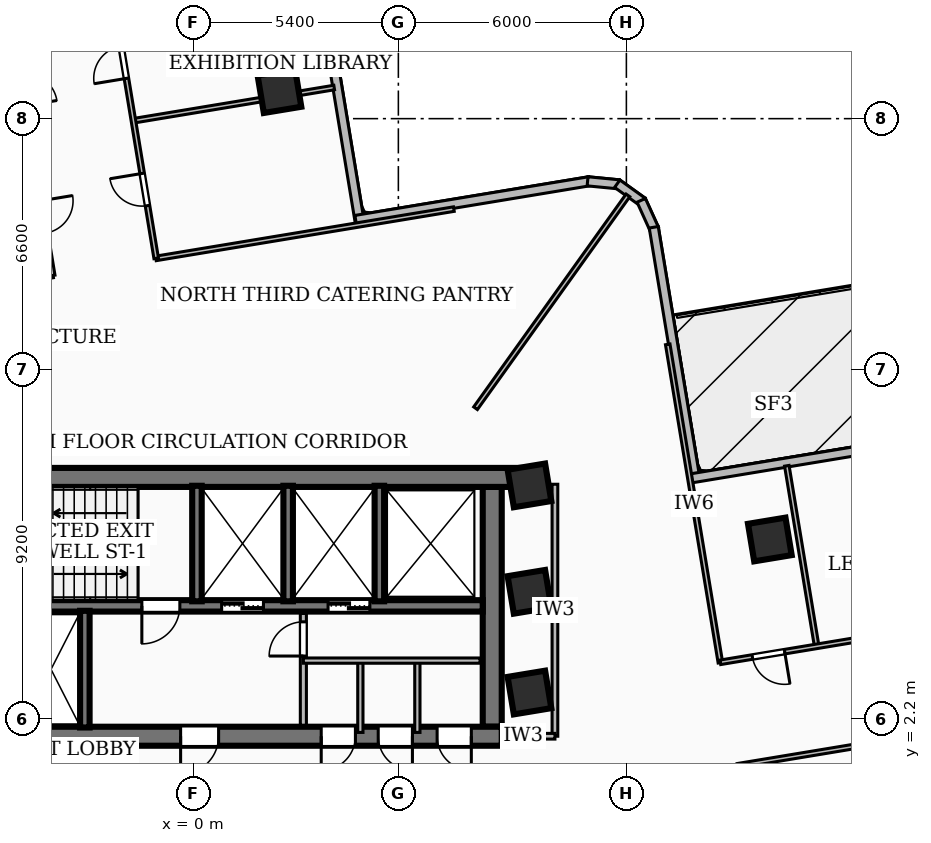
"""IFC4 building model, lengths in metres.
Left out: names, types, materials, properties, quantities, classifications, styles, units other than length and angle.
Written with IfcOpenShell. Run it as: python <this file> out.ifc"""

import sys

from ifc_helpers import new_model, si_unit, direction, frame, frame_2d, origin, origin_2d, place, context, subcontext, project, spatial, rectangle, extrude, element, fill, save


model = new_model("IFC4")
c1 = context("Model", 3, precision=1e-05, world=origin(), true_north=direction((0.0, 1.0)))
c2 = subcontext(c1, "Body", "Model", "MODEL_VIEW")
j1 = project(units=[si_unit("LENGTHUNIT", "METRE"), si_unit("PLANEANGLEUNIT", "RADIAN")], contexts=[c1])
p1 = place(None, origin())
s1 = spatial("IfcSite", under=j1, at=p1, CompositionType="ELEMENT")
p2 = place(p1, origin())
s2 = spatial("IfcBuilding", under=s1, at=p2, CompositionType="ELEMENT")
p3 = place(p2, frame((0.0, 0.0, 96.48)))
s3 = spatial("IfcBuildingStorey", under=s2, at=p3, CompositionType="ELEMENT", Elevation=96.48)
p4 = place(p3, frame((-8.78, 8.56, 0.0), z_axis=(0.0, 0.0, 1.0), x_axis=(1.0, 0.0, 0.0)))
e1 = element("IfcWall", 1, at=p4, inside=s3, PredefinedType="SHEAR", context=c2, shape_type="SweptSolid", body=[
    extrude(rectangle(XDim=17.56, YDim=0.5, at=frame_2d((8.78, 0.0))), origin(), (0.0, 0.0, 1.0), 3.34),
])
p5 = place(p3, frame((8.12, 1.75, 0.0), z_axis=(0.0, 0.0, 1.0), x_axis=(-1.0, 0.0, 0.0)))
e2 = element("IfcWall", 2, at=p5, inside=s3, PredefinedType="SHEAR", context=c2, shape_type="SweptSolid", body=[
    extrude(rectangle(XDim=16.24, YDim=0.5, at=frame_2d((8.12, 0.0))), origin(), (0.0, 0.0, 1.0), 3.34),
])
p6 = place(p5, frame((7.45, 0.0, 0.0)))
e3 = element("IfcOpeningElement", 3, at=p6, cuts=e2, PredefinedType="OPENING", context=c2, shape_type="SweptSolid", body=[
    extrude(rectangle(XDim=1.0, YDim=2.1, at=frame_2d((0.5, 1.05))), frame((0.0, 0.26, 0.0), z_axis=(0.0, -1.0, 0.0), x_axis=(1.0, 0.0, 0.0)), (0.0, 0.0, 1.0), 0.52),
])
p7 = place(p5, frame((3.85, 0.0, 0.0)))
e4 = element("IfcOpeningElement", 4, at=p7, cuts=e2, PredefinedType="OPENING", context=c2, shape_type="SweptSolid", body=[
    extrude(rectangle(XDim=0.9, YDim=2.06, at=frame_2d((0.45, 1.03))), frame((0.0, 0.26, 0.0), z_axis=(0.0, -1.0, 0.0), x_axis=(1.0, 0.0, 0.0)), (0.0, 0.0, 1.0), 0.52),
])
p8 = place(p5, frame((2.35, 0.0, 0.0)))
e5 = element("IfcOpeningElement", 5, at=p8, cuts=e2, PredefinedType="OPENING", context=c2, shape_type="SweptSolid", body=[
    extrude(rectangle(XDim=0.9, YDim=2.06, at=frame_2d((0.45, 1.03))), frame((0.0, 0.26, 0.0), z_axis=(0.0, -1.0, 0.0), x_axis=(1.0, 0.0, 0.0)), (0.0, 0.0, 1.0), 0.52),
])
p9 = place(p5, frame((0.8, 0.0, 0.0)))
e6 = element("IfcOpeningElement", 6, at=p9, cuts=e2, PredefinedType="OPENING", context=c2, shape_type="SweptSolid", body=[
    extrude(rectangle(XDim=0.9, YDim=2.06, at=frame_2d((0.45, 1.03))), frame((0.0, 0.26, 0.0), z_axis=(0.0, -1.0, 0.0), x_axis=(1.0, 0.0, 0.0)), (0.0, 0.0, 1.0), 0.52),
])
p10 = place(p3, frame((7.87, 8.31, 0.0), z_axis=(0.0, 0.0, 1.0), x_axis=(0.0, -1.0, 0.0)))
e7 = element("IfcWall", 7, at=p10, inside=s3, PredefinedType="SHEAR", context=c2, shape_type="SweptSolid", body=[
    extrude(rectangle(XDim=6.31, YDim=0.5, at=frame_2d((3.155, 0.0))), origin(), (0.0, 0.0, 1.0), 3.34),
])
p11 = place(p3, frame((7.62, 5.18, 0.0), z_axis=(0.0, 0.0, 1.0), x_axis=(-1.0, 0.0, 0.0)))
e8 = element("IfcWall", 8, at=p11, inside=s3, PredefinedType="SOLIDWALL", context=c2, shape_type="SweptSolid", body=[
    extrude(rectangle(XDim=15.24, YDim=0.3, at=frame_2d((7.62, 0.0))), origin(), (0.0, 0.0, 1.0), 3.34),
])
p12 = place(p11, frame((5.77, 0.0, 0.0)))
e9 = element("IfcOpeningElement", 9, at=p12, cuts=e8, PredefinedType="OPENING", context=c2, shape_type="SweptSolid", body=[
    extrude(rectangle(XDim=1.1, YDim=2.15, at=frame_2d((0.55, 1.075))), frame((0.0, 0.16, 0.0), z_axis=(0.0, -1.0, 0.0), x_axis=(1.0, 0.0, 0.0)), (0.0, 0.0, 1.0), 0.32),
])
p13 = place(p11, frame((2.97, 0.0, 0.0)))
e10 = element("IfcOpeningElement", 10, at=p13, cuts=e8, PredefinedType="OPENING", context=c2, shape_type="SweptSolid", body=[
    extrude(rectangle(XDim=1.1, YDim=2.15, at=frame_2d((0.55, 1.075))), frame((0.0, 0.16, 0.0), z_axis=(0.0, -1.0, 0.0), x_axis=(1.0, 0.0, 0.0)), (0.0, 0.0, 1.0), 0.32),
])
p14 = place(p11, frame((7.97, 0.0, 0.0)))
e11 = element("IfcOpeningElement", 11, at=p14, cuts=e8, PredefinedType="OPENING", context=c2, shape_type="SweptSolid", body=[
    extrude(rectangle(XDim=1.0, YDim=2.1, at=frame_2d((0.5, 1.05))), frame((0.0, 0.16, 0.0), z_axis=(0.0, -1.0, 0.0), x_axis=(1.0, 0.0, 0.0)), (0.0, 0.0, 1.0), 0.32),
])
for number, where, z_axis, x_axis in (
    (12, (0.1, 5.3, 0.0), (0.0, 0.0, 1.0), (0.0, 1.0, 0.0)),
    (13, (2.5, 5.3, 0.0), (0.0, 0.0, 1.0), (0.0, 1.0, 0.0)),
    (14, (4.9, 5.3, 0.0), (0.0, 0.0, 1.0), (0.0, 1.0, 0.0)),
):
    element("IfcWall", number, at=place(p3, frame(where, z_axis=z_axis, x_axis=x_axis)), inside=s3, PredefinedType="SOLIDWALL", context=c2, shape_type="SweptSolid", body=[
        extrude(rectangle(XDim=3.04, YDim=0.25, at=frame_2d((1.52, 0.0))), origin(), (0.0, 0.0, 1.0), 3.34),
    ])
p15 = place(p3, frame((-2.85, 1.98, 0.0), z_axis=(0.0, 0.0, 1.0), x_axis=(0.0, 1.0, 0.0)))
e15 = element("IfcWall", 15, at=p15, inside=s3, PredefinedType="SOLIDWALL", context=c2, shape_type="SweptSolid", body=[
    extrude(rectangle(XDim=3.07, YDim=0.25, at=frame_2d((1.535, 0.0))), origin(), (0.0, 0.0, 1.0), 3.34),
])
for number, where, z_axis, x_axis in (
    (16, (8.85, 2.9, 0.0), (0.0, 0.0, 1.0), (0.987, 0.163, 0.0)),
    (17, (8.85, 5.55, 0.0), (0.0, 0.0, 1.0), (0.987, 0.163, 0.0)),
    (18, (8.85, 8.35, 0.0), (0.0, 0.0, 1.0), (0.987, 0.163, 0.0)),
    (19, (15.175, 6.927, 0.0), (0.0, 0.0, 1.0), (0.987, 0.163, 0.0)),
    (20, (2.271, 18.724, 0.0), (0.0, 0.0, 1.0), (0.987, 0.163, 0.0)),
):
    element("IfcColumn", number, at=place(p3, frame(where, z_axis=z_axis, x_axis=x_axis)), inside=s3, PredefinedType="COLUMN", context=c2, shape_type="SweptSolid", body=[
        extrude(rectangle(XDim=1.0, YDim=1.0, at=origin_2d()), origin(), (0.0, 0.0, 1.0), 3.6),
    ])
p16 = place(p3, frame((2.415, 27.169, 0.0), z_axis=(0.0, 0.0, 1.0), x_axis=(0.163307072567, -0.986575288587, 0.0)))
e21 = element("IfcWall", 21, at=p16, inside=s3, PredefinedType="SOLIDWALL", context=c2, shape_type="SweptSolid", body=[
    extrude(rectangle(XDim=12.075, YDim=0.24, at=frame_2d((6.038, 0.0))), origin(), (0.0, 0.0, 1.0), 2.486),
])
p17 = place(p3, frame((4.276, 15.335, 0.0), z_axis=(0.0, 0.0, 1.0), x_axis=(0.986586851863, 0.16323720082, 0.0)))
e22 = element("IfcWall", 22, at=p17, inside=s3, PredefinedType="SOLIDWALL", context=c2, shape_type="SweptSolid", body=[
    extrude(rectangle(XDim=6.237, YDim=0.24, at=frame_2d((3.118, 0.0))), origin(), (0.0, 0.0, 1.0), 2.486),
])
p18 = place(p3, frame((10.379, 16.351, 0.0), z_axis=(0.0, 0.0, 1.0), x_axis=(0.995335447313, -0.096474594184, 0.0)))
e23 = element("IfcWall", 23, at=p18, inside=s3, PredefinedType="SOLIDWALL", context=c2, shape_type="SweptSolid", body=[
    extrude(rectangle(XDim=0.83, YDim=0.24, at=frame_2d((0.415, 0.0))), origin(), (0.0, 0.0, 1.0), 3.34),
])
p19 = place(p3, frame((11.16, 16.288, 0.0), z_axis=(0.0, 0.0, 1.0), x_axis=(0.812068662375, -0.583561896965, 0.0)))
e24 = element("IfcWall", 24, at=p19, inside=s3, PredefinedType="SOLIDWALL", context=c2, shape_type="SweptSolid", body=[
    extrude(rectangle(XDim=0.814, YDim=0.24, at=frame_2d((0.407, 0.0))), origin(), (0.0, 0.0, 1.0), 3.34),
])
p20 = place(p3, frame((11.791, 15.851, 0.0), z_axis=(0.0, 0.0, 1.0), x_axis=(0.412696106872, -0.910868773958, 0.0)))
e25 = element("IfcWall", 25, at=p20, inside=s3, PredefinedType="SOLIDWALL", context=c2, shape_type="SweptSolid", body=[
    extrude(rectangle(XDim=0.831, YDim=0.24, at=frame_2d((0.416, 0.0))), origin(), (0.0, 0.0, 1.0), 3.34),
])
p21 = place(p3, frame((12.12, 15.142, 0.0), z_axis=(0.0, 0.0, 1.0), x_axis=(0.163241835244, -0.986586085056, 0.0)))
e26 = element("IfcWall", 26, at=p21, inside=s3, PredefinedType="SOLIDWALL", context=c2, shape_type="SweptSolid", body=[
    extrude(rectangle(XDim=6.775, YDim=0.24, at=frame_2d((3.387, 0.0))), origin(), (0.0, 0.0, 1.0), 3.34),
])
p22 = place(p3, frame((13.115, 8.537, 0.0), z_axis=(0.0, 0.0, 1.0), x_axis=(0.986576548161, 0.163299463007, 0.0)))
e27 = element("IfcWall", 27, at=p22, inside=s3, PredefinedType="SOLIDWALL", context=c2, shape_type="SweptSolid", body=[
    extrude(rectangle(XDim=16.277, YDim=0.24, at=frame_2d((8.138, 0.0))), origin(), (0.0, 0.0, 1.0), 3.34),
])
p23 = place(p22, frame((4.4, 0.0, 0.0)))
e28 = element("IfcOpeningElement", 28, at=p23, cuts=e27, PredefinedType="OPENING", context=c2, shape_type="SweptSolid", body=[
    extrude(rectangle(XDim=1.1, YDim=2.1, at=frame_2d((0.55, 1.05))), frame((0.0, 0.13, 0.0), z_axis=(0.0, -1.0, 0.0), x_axis=(1.0, 0.0, 0.0)), (0.0, 0.0, 1.0), 0.26),
])
p24 = place(p3, frame((2.9, 2.04, 0.0), z_axis=(0.0, 0.0, 1.0), x_axis=(0.0, 1.0, 0.0)))
e29 = element("IfcWall", 29, at=p24, inside=s3, PredefinedType="PARTITIONING", context=c2, shape_type="SweptSolid", body=[
    extrude(rectangle(XDim=2.94, YDim=0.16, at=frame_2d((1.47, 0.0))), origin(), (0.0, 0.0, 1.0), 2.405),
])
p25 = place(p24, frame((1.82, 0.0, 0.0)))
e30 = element("IfcOpeningElement", 30, at=p25, cuts=e29, PredefinedType="OPENING", context=c2, shape_type="SweptSolid", body=[
    extrude(rectangle(XDim=0.9, YDim=2.06, at=frame_2d((0.45, 1.03))), frame((0.0, 0.09, 0.0), z_axis=(0.0, -1.0, 0.0), x_axis=(1.0, 0.0, 0.0)), (0.0, 0.0, 1.0), 0.18),
])
p26 = place(p3, frame((2.9, 3.74, 0.0), z_axis=(0.0, 0.0, 1.0), x_axis=(1.0, 0.0, 0.0)))
e31 = element("IfcWall", 31, at=p26, inside=s3, PredefinedType="PARTITIONING", context=c2, shape_type="SweptSolid", body=[
    extrude(rectangle(XDim=4.65, YDim=0.138, at=frame_2d((2.325, 0.0))), origin(), (0.0, 0.0, 1.0), 3.34),
])
for number, where, z_axis, x_axis in (
    (32, (4.4, 1.85, 0.0), (0.0, 0.0, 1.0), (0.0, 1.0, 0.0)),
    (33, (5.9, 1.85, 0.0), (0.0, 0.0, 1.0), (0.0, 1.0, 0.0)),
):
    element("IfcWall", number, at=place(p3, frame(where, z_axis=z_axis, x_axis=x_axis)), inside=s3, PredefinedType="PARTITIONING", context=c2, shape_type="SweptSolid", body=[
        extrude(rectangle(XDim=1.89, YDim=0.138, at=frame_2d((0.945, 0.0))), origin(), (0.0, 0.0, 1.0), 2.405),
    ])
p27 = place(p3, frame((9.52, 1.75, 0.0), z_axis=(0.0, 0.0, 1.0), x_axis=(0.0, 1.0, 0.0)))
e34 = element("IfcWall", 34, at=p27, inside=s3, PredefinedType="PARTITIONING", context=c2, shape_type="SweptSolid", body=[
    extrude(rectangle(XDim=6.63, YDim=0.15, at=frame_2d((3.315, 0.0))), origin(), (0.0, 0.0, 1.0), 2.486),
])
p28 = place(p3, frame((7.85, 1.75, 0.0), z_axis=(0.0, 0.0, 1.0), x_axis=(1.0, 0.0, 0.0)))
e35 = element("IfcWall", 35, at=p28, inside=s3, PredefinedType="PARTITIONING", context=c2, shape_type="SweptSolid", body=[
    extrude(rectangle(XDim=1.67, YDim=0.15, at=frame_2d((0.835, 0.0))), origin(), (0.0, 0.0, 1.0), 2.405),
])
p29 = place(p3, frame((7.431, 10.38, 0.0), z_axis=(0.0, 0.0, 1.0), x_axis=(0.582126278944, 0.813098392178, 0.0)))
e36 = element("IfcWall", 36, at=p29, inside=s3, PredefinedType="PARTITIONING", context=c2, shape_type="SweptSolid", body=[
    extrude(rectangle(XDim=6.889, YDim=0.12, at=frame_2d((3.444, 0.0))), origin(), (0.0, 0.0, 1.0), 2.486),
])
p30 = place(p3, frame((13.874, 3.686, 0.0), z_axis=(0.0, 0.0, 1.0), x_axis=(-0.163270245909, 0.98658138377, 0.0)))
e37 = element("IfcWall", 37, at=p30, inside=s3, PredefinedType="PARTITIONING", context=c2, shape_type="SweptSolid", body=[
    extrude(rectangle(XDim=8.489, YDim=0.12, at=frame_2d((4.245, 0.0))), origin(), (0.0, 0.0, 1.0), 2.486),
])
p31 = place(p3, frame((16.405, 4.135, 0.0), z_axis=(0.0, 0.0, 1.0), x_axis=(-0.163276056047, 0.986580422227, 0.0)))
e38 = element("IfcWall", 38, at=p31, inside=s3, PredefinedType="PARTITIONING", context=c2, shape_type="SweptSolid", body=[
    extrude(rectangle(XDim=4.795, YDim=0.12, at=frame_2d((2.398, 0.0))), origin(), (0.0, 0.0, 1.0), 2.486),
])
p32 = place(p3, frame((21.114, 4.894, 0.0), z_axis=(0.0, 0.0, 1.0), x_axis=(-0.986566884893, -0.163357833093, 0.0)))
e39 = element("IfcWall", 39, at=p32, inside=s3, PredefinedType="PARTITIONING", context=c2, shape_type="SweptSolid", body=[
    extrude(rectangle(XDim=7.34, YDim=0.12, at=frame_2d((3.67, 0.0))), origin(), (0.0, 0.0, 1.0), 3.34),
])
p33 = place(p32, frame((5.625, 0.0, 0.0)))
e40 = element("IfcOpeningElement", 40, at=p33, cuts=e39, PredefinedType="OPENING", context=c2, shape_type="SweptSolid", body=[
    extrude(rectangle(XDim=0.86, YDim=2.04, at=frame_2d((0.43, 1.02))), frame((0.0, 0.07, 0.0), z_axis=(0.0, -1.0, 0.0), x_axis=(1.0, 0.0, 0.0)), (0.0, 0.0, 1.0), 0.14),
])
p34 = place(p32, frame((1.955, 0.0, 0.0)))
e41 = element("IfcOpeningElement", 41, at=p34, cuts=e39, PredefinedType="OPENING", context=c2, shape_type="SweptSolid", body=[
    extrude(rectangle(XDim=0.86, YDim=2.04, at=frame_2d((0.43, 1.02))), frame((0.0, 0.07, 0.0), z_axis=(0.0, -1.0, 0.0), x_axis=(1.0, 0.0, 0.0)), (0.0, 0.0, 1.0), 0.14),
])
p35 = place(p3, frame((14.324, 0.972, 0.0), z_axis=(0.0, 0.0, 1.0), x_axis=(0.986566884893, 0.163357833093, 0.0)))
e42 = element("IfcWall", 42, at=p35, inside=s3, PredefinedType="PARTITIONING", context=c2, shape_type="SweptSolid", body=[
    extrude(rectangle(XDim=7.34, YDim=0.12, at=frame_2d((3.67, 0.0))), origin(), (0.0, 0.0, 1.0), 3.34),
])
p36 = place(p35, frame((3.19, 0.0, 0.0)))
e43 = element("IfcOpeningElement", 43, at=p36, cuts=e42, PredefinedType="OPENING", context=c2, shape_type="SweptSolid", body=[
    extrude(rectangle(XDim=0.95, YDim=2.08, at=frame_2d((0.475, 1.04))), frame((0.0, 0.07, 0.0), z_axis=(0.0, -1.0, 0.0), x_axis=(1.0, 0.0, 0.0)), (0.0, 0.0, 1.0), 0.14),
])
p37 = place(p3, frame((-3.686, 13.874, 0.0), z_axis=(0.0, 0.0, 1.0), x_axis=(-0.98658138377, -0.163270245909, 0.0)))
e44 = element("IfcWall", 44, at=p37, inside=s3, PredefinedType="PARTITIONING", context=c2, shape_type="SweptSolid", body=[
    extrude(rectangle(XDim=8.489, YDim=0.12, at=frame_2d((4.245, 0.0))), origin(), (0.0, 0.0, 1.0), 2.486),
])
p38 = place(p3, frame((6.86, 15.62, 0.0), z_axis=(0.0, 0.0, 1.0), x_axis=(-0.986575116384, -0.16330811288, 0.0)))
e45 = element("IfcWall", 45, at=p38, inside=s3, PredefinedType="PARTITIONING", context=c2, shape_type="SweptSolid", body=[
    extrude(rectangle(XDim=7.949, YDim=0.12, at=frame_2d((3.974, 0.0))), origin(), (0.0, 0.0, 1.0), 2.486),
])
p39 = place(p3, frame((3.711, 18.819, 0.0), z_axis=(0.0, 0.0, 1.0), x_axis=(-0.986548097851, -0.163471253213, 0.0)))
e46 = element("IfcWall", 46, at=p39, inside=s3, PredefinedType="PARTITIONING", context=c2, shape_type="SweptSolid", body=[
    extrude(rectangle(XDim=5.335, YDim=0.12, at=frame_2d((2.667, 0.0))), origin(), (0.0, 0.0, 1.0), 2.486),
])
p40 = place(p3, frame((-4.804, 20.572, 0.0), z_axis=(0.0, 0.0, 1.0), x_axis=(0.163308569386, -0.986575040818, 0.0)))
e47 = element("IfcWall", 47, at=p40, inside=s3, PredefinedType="PARTITIONING", context=c2, shape_type="SweptSolid", body=[
    extrude(rectangle(XDim=6.79, YDim=0.12, at=frame_2d((3.395, 0.0))), origin(), (0.0, 0.0, 1.0), 3.34),
])
p41 = place(p40, frame((4.8, 0.0, 0.0)))
e48 = element("IfcOpeningElement", 48, at=p41, cuts=e47, PredefinedType="OPENING", context=c2, shape_type="SweptSolid", body=[
    extrude(rectangle(XDim=0.86, YDim=2.04, at=frame_2d((0.43, 1.02))), frame((0.0, 0.07, 0.0), z_axis=(0.0, -1.0, 0.0), x_axis=(1.0, 0.0, 0.0)), (0.0, 0.0, 1.0), 0.14),
])
p42 = place(p40, frame((1.405, 0.0, 0.0)))
e49 = element("IfcOpeningElement", 49, at=p42, cuts=e47, PredefinedType="OPENING", context=c2, shape_type="SweptSolid", body=[
    extrude(rectangle(XDim=0.86, YDim=2.04, at=frame_2d((0.43, 1.02))), frame((0.0, 0.07, 0.0), z_axis=(0.0, -1.0, 0.0), x_axis=(1.0, 0.0, 0.0)), (0.0, 0.0, 1.0), 0.14),
])
p43 = place(p3, frame((-0.972, 14.324, 0.0), z_axis=(0.0, 0.0, 1.0), x_axis=(-0.163366745174, 0.98656540917, 0.0)))
e50 = element("IfcWall", 50, at=p43, inside=s3, PredefinedType="PARTITIONING", context=c2, shape_type="SweptSolid", body=[
    extrude(rectangle(XDim=6.789, YDim=0.12, at=frame_2d((3.395, 0.0))), origin(), (0.0, 0.0, 1.0), 3.34),
])
p44 = place(p43, frame((1.405, 0.0, 0.0)))
e51 = element("IfcOpeningElement", 51, at=p44, cuts=e50, PredefinedType="OPENING", context=c2, shape_type="SweptSolid", body=[
    extrude(rectangle(XDim=0.86, YDim=2.04, at=frame_2d((0.43, 1.02))), frame((0.0, 0.07, 0.0), z_axis=(0.0, -1.0, 0.0), x_axis=(1.0, 0.0, 0.0)), (0.0, 0.0, 1.0), 0.14),
])
p45 = place(p43, frame((4.8, 0.0, 0.0)))
e52 = element("IfcOpeningElement", 52, at=p45, cuts=e50, PredefinedType="OPENING", context=c2, shape_type="SweptSolid", body=[
    extrude(rectangle(XDim=0.86, YDim=2.04, at=frame_2d((0.43, 1.02))), frame((0.0, 0.07, 0.0), z_axis=(0.0, -1.0, 0.0), x_axis=(1.0, 0.0, 0.0)), (0.0, 0.0, 1.0), 0.14),
])
p46 = place(p3, frame((-9.555, 19.786, 0.0), z_axis=(0.0, 0.0, 1.0), x_axis=(0.98658208559, 0.163266005016, 0.0)))
e53 = element("IfcWall", 53, at=p46, inside=s3, PredefinedType="PARTITIONING", context=c2, shape_type="SweptSolid", body=[
    extrude(rectangle(XDim=12.93, YDim=0.12, at=frame_2d((6.465, 0.0))), origin(), (0.0, 0.0, 1.0), 2.486),
])
p47 = place(p46, frame((6.365, 0.0, 0.0)))
e54 = element("IfcOpeningElement", 54, at=p47, cuts=e53, PredefinedType="OPENING", context=c2, shape_type="SweptSolid", body=[
    extrude(rectangle(XDim=0.86, YDim=2.04, at=frame_2d((0.43, 1.02))), frame((0.0, 0.07, 0.0), z_axis=(0.0, -1.0, 0.0), x_axis=(1.0, 0.0, 0.0)), (0.0, 0.0, 1.0), 0.14),
])
p48 = place(p46, frame((5.165, 0.0, 0.0)))
e55 = element("IfcOpeningElement", 55, at=p48, cuts=e53, PredefinedType="OPENING", context=c2, shape_type="SweptSolid", body=[
    extrude(rectangle(XDim=0.86, YDim=2.04, at=frame_2d((0.43, 1.02))), frame((0.0, 0.07, 0.0), z_axis=(0.0, -1.0, 0.0), x_axis=(1.0, 0.0, 0.0)), (0.0, 0.0, 1.0), 0.14),
])
p49 = place(p6, origin())
e56 = element("IfcDoor", 56, at=p49, inside=s3, OperationType="SINGLE_SWING_RIGHT", PredefinedType="DOOR", context=c2, shape_type="SweptSolid", body=[
    extrude(rectangle(XDim=1.0, YDim=2.1, at=frame_2d((0.5, 1.05))), frame((0.0, 0.025, 0.0), z_axis=(0.0, -1.0, 0.0), x_axis=(1.0, 0.0, 0.0)), (0.0, 0.0, 1.0), 0.05),
])
fill(e3, e56)
p50 = place(p12, origin())
e57 = element("IfcDoor", 57, at=p50, inside=s3, OperationType="DOUBLE_DOOR_SLIDING", PredefinedType="DOOR", context=c2, shape_type="SweptSolid", body=[
    extrude(rectangle(XDim=1.1, YDim=2.15, at=frame_2d((0.55, 1.075))), frame((0.0, 0.025, 0.0), z_axis=(0.0, -1.0, 0.0), x_axis=(1.0, 0.0, 0.0)), (0.0, 0.0, 1.0), 0.05),
])
fill(e9, e57)
p51 = place(p13, origin())
e58 = element("IfcDoor", 58, at=p51, inside=s3, OperationType="DOUBLE_DOOR_SLIDING", PredefinedType="DOOR", context=c2, shape_type="SweptSolid", body=[
    extrude(rectangle(XDim=1.1, YDim=2.15, at=frame_2d((0.55, 1.075))), frame((0.0, 0.025, 0.0), z_axis=(0.0, -1.0, 0.0), x_axis=(1.0, 0.0, 0.0)), (0.0, 0.0, 1.0), 0.05),
])
fill(e10, e58)
p52 = place(p14, origin())
e59 = element("IfcDoor", 59, at=p52, inside=s3, OperationType="SINGLE_SWING_RIGHT", PredefinedType="DOOR", context=c2, shape_type="SweptSolid", body=[
    extrude(rectangle(XDim=1.0, YDim=2.1, at=frame_2d((0.5, 1.05))), frame((0.0, 0.025, 0.0), z_axis=(0.0, -1.0, 0.0), x_axis=(1.0, 0.0, 0.0)), (0.0, 0.0, 1.0), 0.05),
])
fill(e11, e59)
p53 = place(p7, origin())
e60 = element("IfcDoor", 60, at=p53, inside=s3, OperationType="SINGLE_SWING_RIGHT", PredefinedType="DOOR", context=c2, shape_type="SweptSolid", body=[
    extrude(rectangle(XDim=0.9, YDim=2.06, at=frame_2d((0.45, 1.03))), frame((0.0, 0.025, 0.0), z_axis=(0.0, -1.0, 0.0), x_axis=(1.0, 0.0, 0.0)), (0.0, 0.0, 1.0), 0.05),
])
fill(e4, e60)
p54 = place(p8, origin())
e61 = element("IfcDoor", 61, at=p54, inside=s3, OperationType="SINGLE_SWING_LEFT", PredefinedType="DOOR", context=c2, shape_type="SweptSolid", body=[
    extrude(rectangle(XDim=0.9, YDim=2.06, at=frame_2d((0.45, 1.03))), frame((0.0, 0.025, 0.0), z_axis=(0.0, -1.0, 0.0), x_axis=(1.0, 0.0, 0.0)), (0.0, 0.0, 1.0), 0.05),
])
fill(e5, e61)
p55 = place(p9, origin())
e62 = element("IfcDoor", 62, at=p55, inside=s3, OperationType="SINGLE_SWING_LEFT", PredefinedType="DOOR", context=c2, shape_type="SweptSolid", body=[
    extrude(rectangle(XDim=0.9, YDim=2.06, at=frame_2d((0.45, 1.03))), frame((0.0, 0.025, 0.0), z_axis=(0.0, -1.0, 0.0), x_axis=(1.0, 0.0, 0.0)), (0.0, 0.0, 1.0), 0.05),
])
fill(e6, e62)
p56 = place(p25, origin())
e63 = element("IfcDoor", 63, at=p56, inside=s3, OperationType="SINGLE_SWING_LEFT", PredefinedType="DOOR", context=c2, shape_type="SweptSolid", body=[
    extrude(rectangle(XDim=0.9, YDim=2.06, at=frame_2d((0.45, 1.03))), frame((0.0, 0.025, 0.0), z_axis=(0.0, -1.0, 0.0), x_axis=(1.0, 0.0, 0.0)), (0.0, 0.0, 1.0), 0.05),
])
fill(e30, e63)
p57 = place(p33, origin())
e64 = element("IfcDoor", 64, at=p57, inside=s3, OperationType="SINGLE_SWING_LEFT", PredefinedType="DOOR", context=c2, shape_type="SweptSolid", body=[
    extrude(rectangle(XDim=0.86, YDim=2.04, at=frame_2d((0.43, 1.02))), frame((0.0, 0.025, 0.0), z_axis=(0.0, -1.0, 0.0), x_axis=(1.0, 0.0, 0.0)), (0.0, 0.0, 1.0), 0.05),
])
fill(e40, e64)
p58 = place(p44, origin())
e65 = element("IfcDoor", 65, at=p58, inside=s3, OperationType="SINGLE_SWING_RIGHT", PredefinedType="DOOR", context=c2, shape_type="SweptSolid", body=[
    extrude(rectangle(XDim=0.86, YDim=2.04, at=frame_2d((0.43, 1.02))), frame((0.0, 0.025, 0.0), z_axis=(0.0, -1.0, 0.0), x_axis=(1.0, 0.0, 0.0)), (0.0, 0.0, 1.0), 0.05),
])
fill(e51, e65)
p59 = place(p45, origin())
e66 = element("IfcDoor", 66, at=p59, inside=s3, OperationType="SINGLE_SWING_LEFT", PredefinedType="DOOR", context=c2, shape_type="SweptSolid", body=[
    extrude(rectangle(XDim=0.86, YDim=2.04, at=frame_2d((0.43, 1.02))), frame((0.0, 0.025, 0.0), z_axis=(0.0, -1.0, 0.0), x_axis=(1.0, 0.0, 0.0)), (0.0, 0.0, 1.0), 0.05),
])
fill(e52, e66)
save(model, sys.argv[1])
